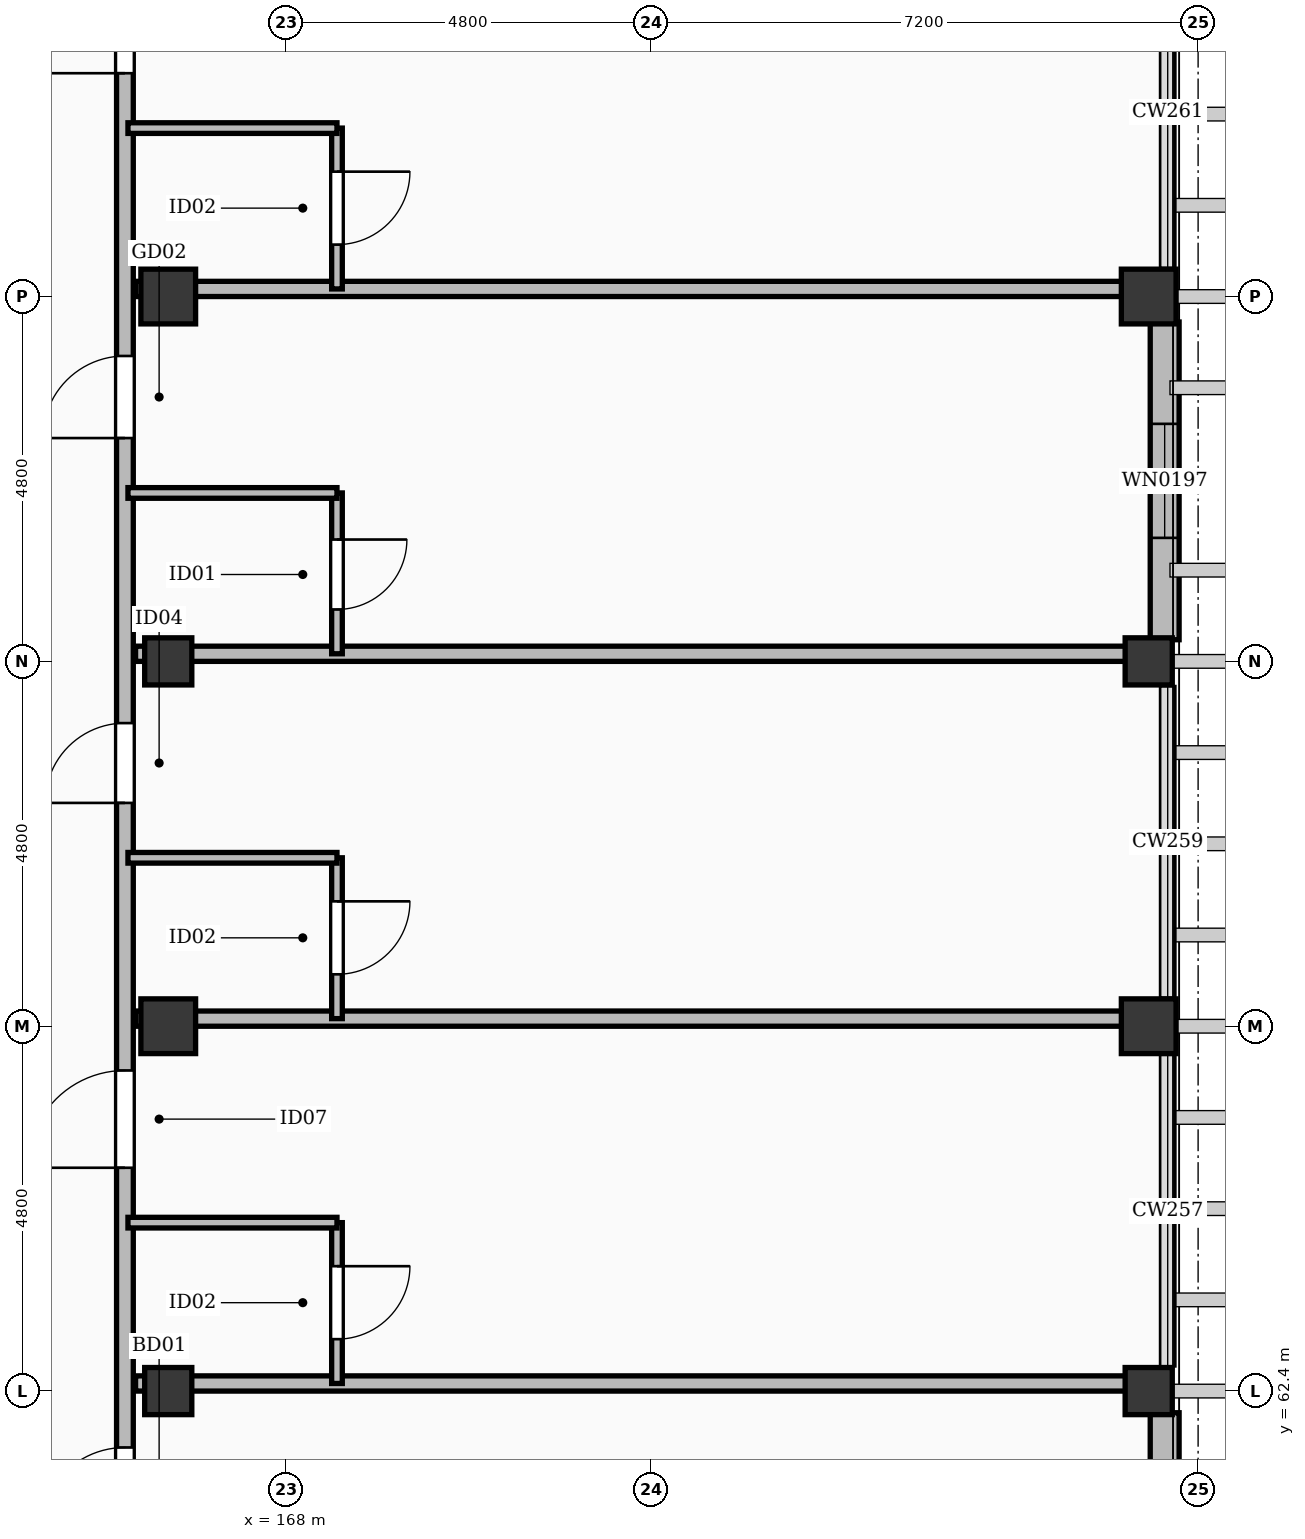
"""IFC4 building model, lengths in metres.
Left out: names, types, materials, properties, quantities, classifications, styles, units other than length and angle.
Written with IfcOpenShell. Run it as: python <this file> out.ifc"""

import sys

from ifc_helpers import new_model, si_unit, direction, frame, frame_2d, origin, origin_2d, place, context, subcontext, project, spatial, rectangle, extrude, element, fill, save


model = new_model("IFC4")
c1 = context("Model", 3, precision=1e-05, world=origin(), true_north=direction((0.0, 1.0)))
c2 = subcontext(c1, "Body", "Model", "MODEL_VIEW")
j1 = project(units=[si_unit("LENGTHUNIT", "METRE"), si_unit("PLANEANGLEUNIT", "RADIAN")], contexts=[c1])
p1 = place(None, origin())
s1 = spatial("IfcSite", under=j1, at=p1, CompositionType="ELEMENT")
p2 = place(p1, origin())
s2 = spatial("IfcBuilding", under=s1, at=p2, CompositionType="ELEMENT")
p3 = place(p2, frame((0.0, 0.0, 31.8)))
s3 = spatial("IfcBuildingStorey", under=s2, at=p3, CompositionType="ELEMENT", Elevation=31.8)
for number, where, z_axis, x_axis in (
    (1, (166.45, 67.2, 0.0), (0.0, 0.0, 1.0), (1.0, 0.0, 0.0)),
    (2, (166.45, 76.8, 0.0), (0.0, 0.0, 1.0), (1.0, 0.0, 0.0)),
    (3, (179.35, 67.2, 0.0), (0.0, 0.0, 1.0), (1.0, 0.0, 0.0)),
    (4, (179.35, 76.8, 0.0), (0.0, 0.0, 1.0), (1.0, 0.0, 0.0)),
):
    element("IfcColumn", number, at=place(p3, frame(where, z_axis=z_axis, x_axis=x_axis)), inside=s3, PredefinedType="COLUMN", context=c2, shape_type="SweptSolid", body=[
        extrude(rectangle(XDim=0.72, YDim=0.72, at=origin_2d()), origin(), (0.0, 0.0, 1.0), 3.6),
    ])
for number, where, z_axis, x_axis in (
    (5, (166.45, 62.4, 0.0), (0.0, 0.0, 1.0), (1.0, 0.0, 0.0)),
    (6, (166.45, 72.0, 0.0), (0.0, 0.0, 1.0), (1.0, 0.0, 0.0)),
    (7, (179.35, 62.4, 0.0), (0.0, 0.0, 1.0), (1.0, 0.0, 0.0)),
    (8, (179.35, 72.0, 0.0), (0.0, 0.0, 1.0), (1.0, 0.0, 0.0)),
):
    element("IfcColumn", number, at=place(p3, frame(where, z_axis=z_axis, x_axis=x_axis)), inside=s3, PredefinedType="COLUMN", context=c2, shape_type="SweptSolid", body=[
        extrude(rectangle(XDim=0.62, YDim=0.62, at=origin_2d()), origin(), (0.0, 0.0, 1.0), 3.6),
    ])
p4 = place(p3, frame((179.56, 62.115, 0.0), z_axis=(0.0, 0.0, 1.0), x_axis=(0.0, -1.0, 0.0)))
e9 = element("IfcWall", 9, at=p4, inside=s3, PredefinedType="SOLIDWALL", context=c2, shape_type="SweptSolid", body=[
    extrude(rectangle(XDim=4.18, YDim=0.38, at=frame_2d((2.09, 0.0))), origin(), (0.0, 0.0, 1.0), 2.602),
])
p5 = place(p4, frame((1.54, 0.0, 0.55)))
e10 = element("IfcOpeningElement", 10, at=p5, cuts=e9, PredefinedType="OPENING", context=c2, shape_type="SweptSolid", body=[
    extrude(rectangle(XDim=1.1, YDim=1.7, at=frame_2d((0.55, 0.85))), frame((0.0, 0.202, 0.0), z_axis=(0.0, -1.0, 0.0), x_axis=(1.0, 0.0, 0.0)), (0.0, 0.0, 1.0), 0.404),
])
p6 = place(p3, frame((179.56, 76.465, 0.0), z_axis=(0.0, 0.0, 1.0), x_axis=(0.0, -1.0, 0.0)))
e11 = element("IfcWall", 11, at=p6, inside=s3, PredefinedType="SOLIDWALL", context=c2, shape_type="SweptSolid", body=[
    extrude(rectangle(XDim=4.18, YDim=0.38, at=frame_2d((2.09, 0.0))), origin(), (0.0, 0.0, 1.0), 2.602),
])
p7 = place(p6, frame((1.34, 0.0, 0.55)))
e12 = element("IfcOpeningElement", 12, at=p7, cuts=e11, PredefinedType="OPENING", context=c2, shape_type="SweptSolid", body=[
    extrude(rectangle(XDim=1.5, YDim=1.74, at=frame_2d((0.75, 0.87))), frame((0.0, 0.202, 0.0), z_axis=(0.0, -1.0, 0.0), x_axis=(1.0, 0.0, 0.0)), (0.0, 0.0, 1.0), 0.404),
])
p8 = place(p3, frame((165.88, 48.35, 0.0), z_axis=(0.0, 0.0, 1.0), x_axis=(0.0, 1.0, 0.0)))
e13 = element("IfcWall", 13, at=p8, inside=s3, PredefinedType="PARTITIONING", context=c2, shape_type="SweptSolid", body=[
    extrude(rectangle(XDim=77.3, YDim=0.22, at=frame_2d((38.65, 0.0))), origin(), (0.0, 0.0, 1.0), 2.602),
])
p9 = place(p8, frame((5.15, 0.0, 0.0)))
e14 = element("IfcOpeningElement", 14, at=p9, cuts=e13, PredefinedType="OPENING", context=c2, shape_type="SweptSolid", body=[
    extrude(rectangle(XDim=1.14, YDim=2.26, at=frame_2d((0.57, 1.13))), frame((0.0, 0.122, 0.0), z_axis=(0.0, -1.0, 0.0), x_axis=(1.0, 0.0, 0.0)), (0.0, 0.0, 1.0), 0.244),
])
p10 = place(p8, frame((12.188, 0.0, 0.0)))
e15 = element("IfcOpeningElement", 15, at=p10, cuts=e13, PredefinedType="OPENING", context=c2, shape_type="SweptSolid", body=[
    extrude(rectangle(XDim=1.12, YDim=2.15, at=frame_2d((0.56, 1.075))), frame((0.0, 0.122, 0.0), z_axis=(0.0, -1.0, 0.0), x_axis=(1.0, 0.0, 0.0)), (0.0, 0.0, 1.0), 0.244),
])
p11 = place(p8, frame((16.988, 0.0, 0.0)))
e16 = element("IfcOpeningElement", 16, at=p11, cuts=e13, PredefinedType="OPENING", context=c2, shape_type="SweptSolid", body=[
    extrude(rectangle(XDim=1.28, YDim=2.16, at=frame_2d((0.64, 1.08))), frame((0.0, 0.122, 0.0), z_axis=(0.0, -1.0, 0.0), x_axis=(1.0, 0.0, 0.0)), (0.0, 0.0, 1.0), 0.244),
])
p12 = place(p8, frame((21.788, 0.0, 0.0)))
e17 = element("IfcOpeningElement", 17, at=p12, cuts=e13, PredefinedType="OPENING", context=c2, shape_type="SweptSolid", body=[
    extrude(rectangle(XDim=1.05, YDim=2.18, at=frame_2d((0.525, 1.09))), frame((0.0, 0.122, 0.0), z_axis=(0.0, -1.0, 0.0), x_axis=(1.0, 0.0, 0.0)), (0.0, 0.0, 1.0), 0.244),
])
p13 = place(p8, frame((26.588, 0.0, 0.0)))
e18 = element("IfcOpeningElement", 18, at=p13, cuts=e13, PredefinedType="OPENING", context=c2, shape_type="SweptSolid", body=[
    extrude(rectangle(XDim=1.08, YDim=2.25, at=frame_2d((0.54, 1.125))), frame((0.0, 0.122, 0.0), z_axis=(0.0, -1.0, 0.0), x_axis=(1.0, 0.0, 0.0)), (0.0, 0.0, 1.0), 0.244),
])
p14 = place(p8, frame((31.388, 0.0, 0.0)))
e19 = element("IfcOpeningElement", 19, at=p14, cuts=e13, PredefinedType="OPENING", context=c2, shape_type="SweptSolid", body=[
    extrude(rectangle(XDim=1.02, YDim=2.2, at=frame_2d((0.51, 1.1))), frame((0.0, 0.122, 0.0), z_axis=(0.0, -1.0, 0.0), x_axis=(1.0, 0.0, 0.0)), (0.0, 0.0, 1.0), 0.244),
])
p15 = place(p8, frame((35.838, 0.0, 0.0)))
e20 = element("IfcOpeningElement", 20, at=p15, cuts=e13, PredefinedType="OPENING", context=c2, shape_type="SweptSolid", body=[
    extrude(rectangle(XDim=1.5, YDim=2.3, at=frame_2d((0.75, 1.15))), frame((0.0, 0.122, 0.0), z_axis=(0.0, -1.0, 0.0), x_axis=(1.0, 0.0, 0.0)), (0.0, 0.0, 1.0), 0.244),
])
p16 = place(p8, frame((40.988, 0.0, 0.0)))
e21 = element("IfcOpeningElement", 21, at=p16, cuts=e13, PredefinedType="OPENING", context=c2, shape_type="SweptSolid", body=[
    extrude(rectangle(XDim=1.12, YDim=2.15, at=frame_2d((0.56, 1.075))), frame((0.0, 0.122, 0.0), z_axis=(0.0, -1.0, 0.0), x_axis=(1.0, 0.0, 0.0)), (0.0, 0.0, 1.0), 0.244),
])
p17 = place(p8, frame((45.788, 0.0, 0.0)))
e22 = element("IfcOpeningElement", 22, at=p17, cuts=e13, PredefinedType="OPENING", context=c2, shape_type="SweptSolid", body=[
    extrude(rectangle(XDim=1.28, YDim=2.16, at=frame_2d((0.64, 1.08))), frame((0.0, 0.122, 0.0), z_axis=(0.0, -1.0, 0.0), x_axis=(1.0, 0.0, 0.0)), (0.0, 0.0, 1.0), 0.244),
])
p18 = place(p8, frame((50.588, 0.0, 0.0)))
e23 = element("IfcOpeningElement", 23, at=p18, cuts=e13, PredefinedType="OPENING", context=c2, shape_type="SweptSolid", body=[
    extrude(rectangle(XDim=1.05, YDim=2.18, at=frame_2d((0.525, 1.09))), frame((0.0, 0.122, 0.0), z_axis=(0.0, -1.0, 0.0), x_axis=(1.0, 0.0, 0.0)), (0.0, 0.0, 1.0), 0.244),
])
p19 = place(p8, frame((55.388, 0.0, 0.0)))
e24 = element("IfcOpeningElement", 24, at=p19, cuts=e13, PredefinedType="OPENING", context=c2, shape_type="SweptSolid", body=[
    extrude(rectangle(XDim=1.08, YDim=2.25, at=frame_2d((0.54, 1.125))), frame((0.0, 0.122, 0.0), z_axis=(0.0, -1.0, 0.0), x_axis=(1.0, 0.0, 0.0)), (0.0, 0.0, 1.0), 0.244),
])
p20 = place(p8, frame((60.188, 0.0, 0.0)))
e25 = element("IfcOpeningElement", 25, at=p20, cuts=e13, PredefinedType="OPENING", context=c2, shape_type="SweptSolid", body=[
    extrude(rectangle(XDim=1.02, YDim=2.2, at=frame_2d((0.51, 1.1))), frame((0.0, 0.122, 0.0), z_axis=(0.0, -1.0, 0.0), x_axis=(1.0, 0.0, 0.0)), (0.0, 0.0, 1.0), 0.244),
])
p21 = place(p8, frame((64.638, 0.0, 0.0)))
e26 = element("IfcOpeningElement", 26, at=p21, cuts=e13, PredefinedType="OPENING", context=c2, shape_type="SweptSolid", body=[
    extrude(rectangle(XDim=1.5, YDim=2.3, at=frame_2d((0.75, 1.15))), frame((0.0, 0.122, 0.0), z_axis=(0.0, -1.0, 0.0), x_axis=(1.0, 0.0, 0.0)), (0.0, 0.0, 1.0), 0.244),
])
p22 = place(p8, frame((69.788, 0.0, 0.0)))
e27 = element("IfcOpeningElement", 27, at=p22, cuts=e13, PredefinedType="OPENING", context=c2, shape_type="SweptSolid", body=[
    extrude(rectangle(XDim=1.12, YDim=2.15, at=frame_2d((0.56, 1.075))), frame((0.0, 0.122, 0.0), z_axis=(0.0, -1.0, 0.0), x_axis=(1.0, 0.0, 0.0)), (0.0, 0.0, 1.0), 0.244),
])
p23 = place(p8, frame((74.588, 0.0, 0.0)))
e28 = element("IfcOpeningElement", 28, at=p23, cuts=e13, PredefinedType="OPENING", context=c2, shape_type="SweptSolid", body=[
    extrude(rectangle(XDim=1.28, YDim=2.16, at=frame_2d((0.64, 1.08))), frame((0.0, 0.122, 0.0), z_axis=(0.0, -1.0, 0.0), x_axis=(1.0, 0.0, 0.0)), (0.0, 0.0, 1.0), 0.244),
])
p24 = place(p3, frame((166.02, 62.5, 0.0), z_axis=(0.0, 0.0, 1.0), x_axis=(1.0, 0.0, 0.0)))
e29 = element("IfcWall", 29, at=p24, inside=s3, PredefinedType="PARTITIONING", context=c2, shape_type="SweptSolid", body=[
    extrude(rectangle(XDim=13.23, YDim=0.2, at=frame_2d((6.615, 0.0))), origin(), (0.0, 0.0, 1.0), 2.602),
])
p25 = place(p3, frame((168.67, 62.5, 0.0), z_axis=(0.0, 0.0, 1.0), x_axis=(0.0, 1.0, 0.0)))
e30 = element("IfcWall", 30, at=p25, inside=s3, PredefinedType="PARTITIONING", context=c2, shape_type="SweptSolid", body=[
    extrude(rectangle(XDim=2.116, YDim=0.14, at=frame_2d((1.058, 0.0))), origin(), (0.0, 0.0, 1.0), 2.732),
])
p26 = place(p25, frame((0.583, 0.0, 0.0)))
e31 = element("IfcOpeningElement", 31, at=p26, cuts=e30, PredefinedType="OPENING", context=c2, shape_type="SweptSolid", body=[
    extrude(rectangle(XDim=0.96, YDim=2.12, at=frame_2d((0.48, 1.06))), frame((0.0, 0.082, 0.0), z_axis=(0.0, -1.0, 0.0), x_axis=(1.0, 0.0, 0.0)), (0.0, 0.0, 1.0), 0.164),
])
p27 = place(p3, frame((165.92, 64.616, 0.0), z_axis=(0.0, 0.0, 1.0), x_axis=(1.0, 0.0, 0.0)))
e32 = element("IfcWall", 32, at=p27, inside=s3, PredefinedType="PARTITIONING", context=c2, shape_type="SweptSolid", body=[
    extrude(rectangle(XDim=2.75, YDim=0.14, at=frame_2d((1.375, 0.0))), origin(), (0.0, 0.0, 1.0), 2.732),
])
p28 = place(p3, frame((166.02, 67.3, 0.0), z_axis=(0.0, 0.0, 1.0), x_axis=(1.0, 0.0, 0.0)))
e33 = element("IfcWall", 33, at=p28, inside=s3, PredefinedType="PARTITIONING", context=c2, shape_type="SweptSolid", body=[
    extrude(rectangle(XDim=13.23, YDim=0.2, at=frame_2d((6.615, 0.0))), origin(), (0.0, 0.0, 1.0), 2.602),
])
p29 = place(p3, frame((168.67, 67.3, 0.0), z_axis=(0.0, 0.0, 1.0), x_axis=(0.0, 1.0, 0.0)))
e34 = element("IfcWall", 34, at=p29, inside=s3, PredefinedType="PARTITIONING", context=c2, shape_type="SweptSolid", body=[
    extrude(rectangle(XDim=2.116, YDim=0.14, at=frame_2d((1.058, 0.0))), origin(), (0.0, 0.0, 1.0), 2.732),
])
p30 = place(p29, frame((0.583, 0.0, 0.0)))
e35 = element("IfcOpeningElement", 35, at=p30, cuts=e34, PredefinedType="OPENING", context=c2, shape_type="SweptSolid", body=[
    extrude(rectangle(XDim=0.96, YDim=2.12, at=frame_2d((0.48, 1.06))), frame((0.0, 0.082, 0.0), z_axis=(0.0, -1.0, 0.0), x_axis=(1.0, 0.0, 0.0)), (0.0, 0.0, 1.0), 0.164),
])
p31 = place(p3, frame((165.92, 69.416, 0.0), z_axis=(0.0, 0.0, 1.0), x_axis=(1.0, 0.0, 0.0)))
e36 = element("IfcWall", 36, at=p31, inside=s3, PredefinedType="PARTITIONING", context=c2, shape_type="SweptSolid", body=[
    extrude(rectangle(XDim=2.75, YDim=0.14, at=frame_2d((1.375, 0.0))), origin(), (0.0, 0.0, 1.0), 2.732),
])
p32 = place(p3, frame((166.02, 72.1, 0.0), z_axis=(0.0, 0.0, 1.0), x_axis=(1.0, 0.0, 0.0)))
e37 = element("IfcWall", 37, at=p32, inside=s3, PredefinedType="PARTITIONING", context=c2, shape_type="SweptSolid", body=[
    extrude(rectangle(XDim=13.23, YDim=0.2, at=frame_2d((6.615, 0.0))), origin(), (0.0, 0.0, 1.0), 2.602),
])
p33 = place(p3, frame((168.67, 72.1, 0.0), z_axis=(0.0, 0.0, 1.0), x_axis=(0.0, 1.0, 0.0)))
e38 = element("IfcWall", 38, at=p33, inside=s3, PredefinedType="PARTITIONING", context=c2, shape_type="SweptSolid", body=[
    extrude(rectangle(XDim=2.116, YDim=0.14, at=frame_2d((1.058, 0.0))), origin(), (0.0, 0.0, 1.0), 2.732),
])
p34 = place(p33, frame((0.583, 0.0, 0.0)))
e39 = element("IfcOpeningElement", 39, at=p34, cuts=e38, PredefinedType="OPENING", context=c2, shape_type="SweptSolid", body=[
    extrude(rectangle(XDim=0.92, YDim=2.1, at=frame_2d((0.46, 1.05))), frame((0.0, 0.082, 0.0), z_axis=(0.0, -1.0, 0.0), x_axis=(1.0, 0.0, 0.0)), (0.0, 0.0, 1.0), 0.164),
])
p35 = place(p3, frame((165.92, 74.216, 0.0), z_axis=(0.0, 0.0, 1.0), x_axis=(1.0, 0.0, 0.0)))
e40 = element("IfcWall", 40, at=p35, inside=s3, PredefinedType="PARTITIONING", context=c2, shape_type="SweptSolid", body=[
    extrude(rectangle(XDim=2.75, YDim=0.14, at=frame_2d((1.375, 0.0))), origin(), (0.0, 0.0, 1.0), 2.732),
])
p36 = place(p3, frame((166.02, 76.9, 0.0), z_axis=(0.0, 0.0, 1.0), x_axis=(1.0, 0.0, 0.0)))
e41 = element("IfcWall", 41, at=p36, inside=s3, PredefinedType="PARTITIONING", context=c2, shape_type="SweptSolid", body=[
    extrude(rectangle(XDim=13.23, YDim=0.2, at=frame_2d((6.615, 0.0))), origin(), (0.0, 0.0, 1.0), 2.602),
])
p37 = place(p3, frame((168.67, 76.9, 0.0), z_axis=(0.0, 0.0, 1.0), x_axis=(0.0, 1.0, 0.0)))
e42 = element("IfcWall", 42, at=p37, inside=s3, PredefinedType="PARTITIONING", context=c2, shape_type="SweptSolid", body=[
    extrude(rectangle(XDim=2.116, YDim=0.14, at=frame_2d((1.058, 0.0))), origin(), (0.0, 0.0, 1.0), 2.732),
])
p38 = place(p37, frame((0.583, 0.0, 0.0)))
e43 = element("IfcOpeningElement", 43, at=p38, cuts=e42, PredefinedType="OPENING", context=c2, shape_type="SweptSolid", body=[
    extrude(rectangle(XDim=0.96, YDim=2.12, at=frame_2d((0.48, 1.06))), frame((0.0, 0.082, 0.0), z_axis=(0.0, -1.0, 0.0), x_axis=(1.0, 0.0, 0.0)), (0.0, 0.0, 1.0), 0.164),
])
p39 = place(p3, frame((165.92, 79.016, 0.0), z_axis=(0.0, 0.0, 1.0), x_axis=(1.0, 0.0, 0.0)))
e44 = element("IfcWall", 44, at=p39, inside=s3, PredefinedType="PARTITIONING", context=c2, shape_type="SweptSolid", body=[
    extrude(rectangle(XDim=2.75, YDim=0.14, at=frame_2d((1.375, 0.0))), origin(), (0.0, 0.0, 1.0), 2.732),
])
p40 = place(p7, origin())
e45 = element("IfcWindow", 45, at=p40, inside=s3, PartitioningType="SINGLE_PANEL", PredefinedType="WINDOW", context=c2, shape_type="SweptSolid", body=[
    extrude(rectangle(XDim=1.5, YDim=1.74, at=frame_2d((0.75, 0.87))), frame((0.0, 0.03, 0.0), z_axis=(0.0, -1.0, 0.0), x_axis=(1.0, 0.0, 0.0)), (0.0, 0.0, 1.0), 0.06),
])
fill(e12, e45)
p41 = place(p10, origin())
e46 = element("IfcDoor", 46, at=p41, inside=s3, OperationType="SINGLE_SWING_LEFT", PredefinedType="DOOR", context=c2, shape_type="SweptSolid", body=[
    extrude(rectangle(XDim=1.12, YDim=2.15, at=frame_2d((0.56, 1.075))), frame((0.0, 0.025, 0.0), z_axis=(0.0, -1.0, 0.0), x_axis=(1.0, 0.0, 0.0)), (0.0, 0.0, 1.0), 0.05),
])
fill(e15, e46)
p42 = place(p11, origin())
e47 = element("IfcDoor", 47, at=p42, inside=s3, OperationType="SINGLE_SWING_LEFT", PredefinedType="DOOR", context=c2, shape_type="SweptSolid", body=[
    extrude(rectangle(XDim=1.28, YDim=2.16, at=frame_2d((0.64, 1.08))), frame((0.0, 0.025, 0.0), z_axis=(0.0, -1.0, 0.0), x_axis=(1.0, 0.0, 0.0)), (0.0, 0.0, 1.0), 0.05),
])
fill(e16, e47)
p43 = place(p26, frame((0.96, 0.0, 0.0), z_axis=(0.0, 0.0, 1.0), x_axis=(-1.0, 0.0, 0.0)))
e48 = element("IfcDoor", 48, at=p43, inside=s3, OperationType="SINGLE_SWING_RIGHT", PredefinedType="DOOR", context=c2, shape_type="SweptSolid", body=[
    extrude(rectangle(XDim=0.96, YDim=2.12, at=frame_2d((0.48, 1.06))), frame((0.0, 0.025, 0.0), z_axis=(0.0, -1.0, 0.0), x_axis=(1.0, 0.0, 0.0)), (0.0, 0.0, 1.0), 0.05),
])
fill(e31, e48)
p44 = place(p12, origin())
e49 = element("IfcDoor", 49, at=p44, inside=s3, OperationType="SINGLE_SWING_LEFT", PredefinedType="DOOR", context=c2, shape_type="SweptSolid", body=[
    extrude(rectangle(XDim=1.05, YDim=2.18, at=frame_2d((0.525, 1.09))), frame((0.0, 0.025, 0.0), z_axis=(0.0, -1.0, 0.0), x_axis=(1.0, 0.0, 0.0)), (0.0, 0.0, 1.0), 0.05),
])
fill(e17, e49)
p45 = place(p30, frame((0.96, 0.0, 0.0), z_axis=(0.0, 0.0, 1.0), x_axis=(-1.0, 0.0, 0.0)))
e50 = element("IfcDoor", 50, at=p45, inside=s3, OperationType="SINGLE_SWING_RIGHT", PredefinedType="DOOR", context=c2, shape_type="SweptSolid", body=[
    extrude(rectangle(XDim=0.96, YDim=2.12, at=frame_2d((0.48, 1.06))), frame((0.0, 0.025, 0.0), z_axis=(0.0, -1.0, 0.0), x_axis=(1.0, 0.0, 0.0)), (0.0, 0.0, 1.0), 0.05),
])
fill(e35, e50)
p46 = place(p13, origin())
e51 = element("IfcDoor", 51, at=p46, inside=s3, OperationType="SINGLE_SWING_LEFT", PredefinedType="DOOR", context=c2, shape_type="SweptSolid", body=[
    extrude(rectangle(XDim=1.08, YDim=2.25, at=frame_2d((0.54, 1.125))), frame((0.0, 0.025, 0.0), z_axis=(0.0, -1.0, 0.0), x_axis=(1.0, 0.0, 0.0)), (0.0, 0.0, 1.0), 0.05),
])
fill(e18, e51)
p47 = place(p34, frame((0.92, 0.0, 0.0), z_axis=(0.0, 0.0, 1.0), x_axis=(-1.0, 0.0, 0.0)))
e52 = element("IfcDoor", 52, at=p47, inside=s3, OperationType="SINGLE_SWING_RIGHT", PredefinedType="DOOR", context=c2, shape_type="SweptSolid", body=[
    extrude(rectangle(XDim=0.92, YDim=2.1, at=frame_2d((0.46, 1.05))), frame((0.0, 0.025, 0.0), z_axis=(0.0, -1.0, 0.0), x_axis=(1.0, 0.0, 0.0)), (0.0, 0.0, 1.0), 0.05),
])
fill(e39, e52)
p48 = place(p14, origin())
e53 = element("IfcDoor", 53, at=p48, inside=s3, OperationType="SINGLE_SWING_LEFT", PredefinedType="DOOR", context=c2, shape_type="SweptSolid", body=[
    extrude(rectangle(XDim=1.02, YDim=2.2, at=frame_2d((0.51, 1.1))), frame((0.0, 0.025, 0.0), z_axis=(0.0, -1.0, 0.0), x_axis=(1.0, 0.0, 0.0)), (0.0, 0.0, 1.0), 0.05),
])
fill(e19, e53)
p49 = place(p38, frame((0.96, 0.0, 0.0), z_axis=(0.0, 0.0, 1.0), x_axis=(-1.0, 0.0, 0.0)))
e54 = element("IfcDoor", 54, at=p49, inside=s3, OperationType="SINGLE_SWING_RIGHT", PredefinedType="DOOR", context=c2, shape_type="SweptSolid", body=[
    extrude(rectangle(XDim=0.96, YDim=2.12, at=frame_2d((0.48, 1.06))), frame((0.0, 0.025, 0.0), z_axis=(0.0, -1.0, 0.0), x_axis=(1.0, 0.0, 0.0)), (0.0, 0.0, 1.0), 0.05),
])
fill(e43, e54)
save(model, sys.argv[1])
